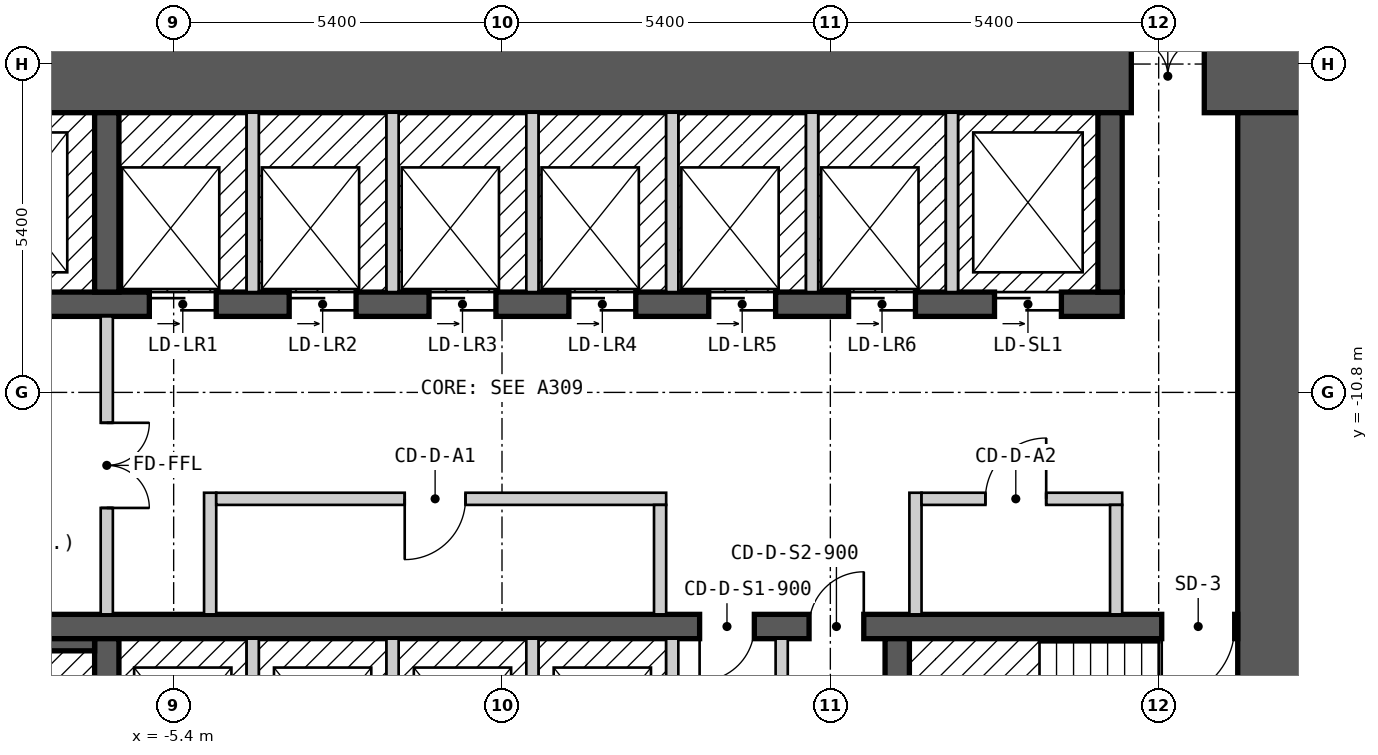
"""IFC4 building model, lengths in metres.
Left out: names, types, materials, properties, quantities, classifications, styles, units other than length and angle.
Written with IfcOpenShell. Run it as: python <this file> out.ifc"""

import sys

from ifc_helpers import new_model, si_unit, direction, frame, frame_2d, origin, place, context, subcontext, project, spatial, rectangle, extrude, element, fill, save


model = new_model("IFC4")
c1 = context("Model", 3, precision=1e-05, world=origin(), true_north=direction((0.0, 1.0)))
c2 = subcontext(c1, "Body", "Model", "MODEL_VIEW")
j1 = project(units=[si_unit("LENGTHUNIT", "METRE"), si_unit("PLANEANGLEUNIT", "RADIAN")], contexts=[c1])
p1 = place(None, origin())
s1 = spatial("IfcSite", under=j1, at=p1, CompositionType="ELEMENT")
p2 = place(p1, origin())
s2 = spatial("IfcBuilding", under=s1, at=p2, CompositionType="ELEMENT")
p3 = place(p2, frame((0.0, 0.0, 23.4)))
s3 = spatial("IfcBuildingStorey", under=s2, at=p3, CompositionType="ELEMENT", Elevation=23.4)
p4 = place(p3, frame((-13.3, -5.6, 0.0), z_axis=(0.0, 0.0, 1.0), x_axis=(1.0, 0.0, 0.0)))
e1 = element("IfcWall", 1, at=p4, inside=s3, PredefinedType="SHEAR", context=c2, shape_type="SweptSolid", body=[
    extrude(rectangle(XDim=26.6, YDim=1.2, at=frame_2d((13.3, 0.0))), origin(), (0.0, 0.0, 1.0), 2.7),
])
p5 = place(p4, frame((23.65, 0.0, 0.0)))
e2 = element("IfcOpeningElement", 2, at=p5, cuts=e1, PredefinedType="OPENING", context=c2, shape_type="SweptSolid", body=[
    extrude(rectangle(XDim=1.2, YDim=2.1, at=frame_2d((0.6, 1.05))), frame((0.0, 0.61, 0.0), z_axis=(0.0, -1.0, 0.0), x_axis=(1.0, 0.0, 0.0)), (0.0, 0.0, 1.0), 1.22),
])
p6 = place(p3, frame((12.7, -17.8, 0.0), z_axis=(0.0, 0.0, 1.0), x_axis=(0.0, 1.0, 0.0)))
e3 = element("IfcWall", 3, at=p6, inside=s3, PredefinedType="SHEAR", context=c2, shape_type="SweptSolid", body=[
    extrude(rectangle(XDim=11.6, YDim=1.2, at=frame_2d((5.8, 0.0))), origin(), (0.0, 0.0, 1.0), 2.7),
])
p7 = place(p3, frame((-12.1, -14.65, 0.0), z_axis=(0.0, 0.0, 1.0), x_axis=(1.0, 0.0, 0.0)))
e4 = element("IfcWall", 4, at=p7, inside=s3, PredefinedType="SHEAR", context=c2, shape_type="SweptSolid", body=[
    extrude(rectangle(XDim=24.2, YDim=0.4, at=frame_2d((12.1, 0.0))), origin(), (0.0, 0.0, 1.0), 2.7),
])
p8 = place(p7, frame((1.3, 0.0, 0.0), z_axis=(0.0, 0.0, 1.0), x_axis=(-1.0, 0.0, 0.0)))
e5 = element("IfcOpeningElement", 5, at=p8, cuts=e4, PredefinedType="OPENING", context=c2, shape_type="SweptSolid", body=[
    extrude(rectangle(XDim=1.2, YDim=2.1, at=frame_2d((0.6, 1.05))), frame((0.0, 0.21, 0.0), z_axis=(0.0, -1.0, 0.0), x_axis=(1.0, 0.0, 0.0)), (0.0, 0.0, 1.0), 0.42),
])
p9 = place(p7, frame((24.15, 0.0, 0.0), z_axis=(0.0, 0.0, 1.0), x_axis=(-1.0, 0.0, 0.0)))
e6 = element("IfcOpeningElement", 6, at=p9, cuts=e4, PredefinedType="OPENING", context=c2, shape_type="SweptSolid", body=[
    extrude(rectangle(XDim=1.2, YDim=2.1, at=frame_2d((0.6, 1.05))), frame((0.0, 0.21, 0.0), z_axis=(0.0, -1.0, 0.0), x_axis=(1.0, 0.0, 0.0)), (0.0, 0.0, 1.0), 0.42),
])
p10 = place(p7, frame((16.25, 0.0, 0.0), z_axis=(0.0, 0.0, 1.0), x_axis=(-1.0, 0.0, 0.0)))
e7 = element("IfcOpeningElement", 7, at=p10, cuts=e4, PredefinedType="OPENING", context=c2, shape_type="SweptSolid", body=[
    extrude(rectangle(XDim=0.9, YDim=2.1, at=frame_2d((0.45, 1.05))), frame((0.0, 0.21, 0.0), z_axis=(0.0, -1.0, 0.0), x_axis=(1.0, 0.0, 0.0)), (0.0, 0.0, 1.0), 0.42),
])
p11 = place(p7, frame((18.05, 0.0, 0.0), z_axis=(0.0, 0.0, 1.0), x_axis=(-1.0, 0.0, 0.0)))
e8 = element("IfcOpeningElement", 8, at=p11, cuts=e4, PredefinedType="OPENING", context=c2, shape_type="SweptSolid", body=[
    extrude(rectangle(XDim=0.9, YDim=2.1, at=frame_2d((0.45, 1.05))), frame((0.0, 0.21, 0.0), z_axis=(0.0, -1.0, 0.0), x_axis=(1.0, 0.0, 0.0)), (0.0, 0.0, 1.0), 0.42),
])
p12 = place(p3, frame((-12.1, -9.35, 0.0), z_axis=(0.0, 0.0, 1.0), x_axis=(1.0, 0.0, 0.0)))
e9 = element("IfcWall", 9, at=p12, inside=s3, PredefinedType="SHEAR", context=c2, shape_type="SweptSolid", body=[
    extrude(rectangle(XDim=22.3, YDim=0.4, at=frame_2d((11.15, 0.0))), origin(), (0.0, 0.0, 1.0), 2.7),
])
p13 = place(p12, frame((0.7, 0.0, 0.0)))
e10 = element("IfcOpeningElement", 10, at=p13, cuts=e9, PredefinedType="OPENING", context=c2, shape_type="SweptSolid", body=[
    extrude(rectangle(XDim=1.1, YDim=2.1, at=frame_2d((0.55, 1.05))), frame((0.0, 0.21, 0.0), z_axis=(0.0, -1.0, 0.0), x_axis=(1.0, 0.0, 0.0)), (0.0, 0.0, 1.0), 0.42),
])
p14 = place(p12, frame((3.5, 0.0, 0.0)))
e11 = element("IfcOpeningElement", 11, at=p14, cuts=e9, PredefinedType="OPENING", context=c2, shape_type="SweptSolid", body=[
    extrude(rectangle(XDim=1.1, YDim=2.1, at=frame_2d((0.55, 1.05))), frame((0.0, 0.21, 0.0), z_axis=(0.0, -1.0, 0.0), x_axis=(1.0, 0.0, 0.0)), (0.0, 0.0, 1.0), 0.42),
])
p15 = place(p12, frame((6.3, 0.0, 0.0)))
e12 = element("IfcOpeningElement", 12, at=p15, cuts=e9, PredefinedType="OPENING", context=c2, shape_type="SweptSolid", body=[
    extrude(rectangle(XDim=1.1, YDim=2.1, at=frame_2d((0.55, 1.05))), frame((0.0, 0.21, 0.0), z_axis=(0.0, -1.0, 0.0), x_axis=(1.0, 0.0, 0.0)), (0.0, 0.0, 1.0), 0.42),
])
p16 = place(p12, frame((8.6, 0.0, 0.0)))
e13 = element("IfcOpeningElement", 13, at=p16, cuts=e9, PredefinedType="OPENING", context=c2, shape_type="SweptSolid", body=[
    extrude(rectangle(XDim=1.1, YDim=2.1, at=frame_2d((0.55, 1.05))), frame((0.0, 0.21, 0.0), z_axis=(0.0, -1.0, 0.0), x_axis=(1.0, 0.0, 0.0)), (0.0, 0.0, 1.0), 0.42),
])
p17 = place(p12, frame((10.9, 0.0, 0.0)))
e14 = element("IfcOpeningElement", 14, at=p17, cuts=e9, PredefinedType="OPENING", context=c2, shape_type="SweptSolid", body=[
    extrude(rectangle(XDim=1.1, YDim=2.1, at=frame_2d((0.55, 1.05))), frame((0.0, 0.21, 0.0), z_axis=(0.0, -1.0, 0.0), x_axis=(1.0, 0.0, 0.0)), (0.0, 0.0, 1.0), 0.42),
])
p18 = place(p12, frame((13.2, 0.0, 0.0)))
e15 = element("IfcOpeningElement", 15, at=p18, cuts=e9, PredefinedType="OPENING", context=c2, shape_type="SweptSolid", body=[
    extrude(rectangle(XDim=1.1, YDim=2.1, at=frame_2d((0.55, 1.05))), frame((0.0, 0.21, 0.0), z_axis=(0.0, -1.0, 0.0), x_axis=(1.0, 0.0, 0.0)), (0.0, 0.0, 1.0), 0.42),
])
p19 = place(p12, frame((15.5, 0.0, 0.0)))
e16 = element("IfcOpeningElement", 16, at=p19, cuts=e9, PredefinedType="OPENING", context=c2, shape_type="SweptSolid", body=[
    extrude(rectangle(XDim=1.1, YDim=2.1, at=frame_2d((0.55, 1.05))), frame((0.0, 0.21, 0.0), z_axis=(0.0, -1.0, 0.0), x_axis=(1.0, 0.0, 0.0)), (0.0, 0.0, 1.0), 0.42),
])
p20 = place(p12, frame((17.8, 0.0, 0.0)))
e17 = element("IfcOpeningElement", 17, at=p20, cuts=e9, PredefinedType="OPENING", context=c2, shape_type="SweptSolid", body=[
    extrude(rectangle(XDim=1.1, YDim=2.1, at=frame_2d((0.55, 1.05))), frame((0.0, 0.21, 0.0), z_axis=(0.0, -1.0, 0.0), x_axis=(1.0, 0.0, 0.0)), (0.0, 0.0, 1.0), 0.42),
])
p21 = place(p12, frame((20.2, 0.0, 0.0)))
e18 = element("IfcOpeningElement", 18, at=p21, cuts=e9, PredefinedType="OPENING", context=c2, shape_type="SweptSolid", body=[
    extrude(rectangle(XDim=1.1, YDim=2.1, at=frame_2d((0.55, 1.05))), frame((0.0, 0.21, 0.0), z_axis=(0.0, -1.0, 0.0), x_axis=(1.0, 0.0, 0.0)), (0.0, 0.0, 1.0), 0.42),
])
for number, where, z_axis, x_axis in (
    (19, (-6.5, -17.8, 0.0), (0.0, 0.0, 1.0), (0.0, 1.0, 0.0)),
    (20, (6.5, -17.8, 0.0), (0.0, 0.0, 1.0), (0.0, 1.0, 0.0)),
    (21, (-6.5, -9.15, 0.0), (0.0, 0.0, 1.0), (0.0, 1.0, 0.0)),
    (22, (10.0, -9.15, 0.0), (0.0, 0.0, 1.0), (0.0, 1.0, 0.0)),
):
    element("IfcWall", number, at=place(p3, frame(where, z_axis=z_axis, x_axis=x_axis)), inside=s3, PredefinedType="SHEAR", context=c2, shape_type="SweptSolid", body=[
        extrude(rectangle(XDim=2.95, YDim=0.4, at=frame_2d((1.475, 0.0))), origin(), (0.0, 0.0, 1.0), 2.7),
    ])
p22 = place(p3, frame((-10.8, -14.95, 0.0), z_axis=(0.0, 0.0, 1.0), x_axis=(1.0, 0.0, 0.0)))
e23 = element("IfcWall", 23, at=p22, inside=s3, PredefinedType="SOLIDWALL", context=c2, shape_type="SweptSolid", body=[
    extrude(rectangle(XDim=4.1, YDim=0.2, at=frame_2d((2.05, 0.0))), origin(), (0.0, 0.0, 1.0), 2.7),
])
p23 = place(p3, frame((-6.5, -14.45, 0.0), z_axis=(0.0, 0.0, 1.0), x_axis=(0.0, 1.0, 0.0)))
e24 = element("IfcWall", 24, at=p23, inside=s3, PredefinedType="PARTITIONING", context=c2, shape_type="SweptSolid", body=[
    extrude(rectangle(XDim=4.9, YDim=0.2, at=frame_2d((2.45, 0.0))), origin(), (0.0, 0.0, 1.0), 2.7),
])
p24 = place(p23, frame((3.15, 0.0, 0.0), z_axis=(0.0, 0.0, 1.0), x_axis=(-1.0, 0.0, 0.0)))
e25 = element("IfcOpeningElement", 25, at=p24, cuts=e24, PredefinedType="OPENING", context=c2, shape_type="SweptSolid", body=[
    extrude(rectangle(XDim=1.4, YDim=2.1, at=frame_2d((0.7, 1.05))), frame((0.0, 0.11, 0.0), z_axis=(0.0, -1.0, 0.0), x_axis=(1.0, 0.0, 0.0)), (0.0, 0.0, 1.0), 0.22),
])
p25 = place(p3, frame((-4.8, -14.45, 0.0), z_axis=(0.0, 0.0, 1.0), x_axis=(0.0, 1.0, 0.0)))
e26 = element("IfcWall", 26, at=p25, inside=s3, PredefinedType="PARTITIONING", context=c2, shape_type="SweptSolid", body=[
    extrude(rectangle(XDim=2.0, YDim=0.2, at=frame_2d((1.0, 0.0))), origin(), (0.0, 0.0, 1.0), 2.7),
])
p26 = place(p3, frame((-4.7, -12.55, 0.0), z_axis=(0.0, 0.0, 1.0), x_axis=(1.0, 0.0, 0.0)))
e27 = element("IfcWall", 27, at=p26, inside=s3, PredefinedType="PARTITIONING", context=c2, shape_type="SweptSolid", body=[
    extrude(rectangle(XDim=7.4, YDim=0.2, at=frame_2d((3.7, 0.0))), origin(), (0.0, 0.0, 1.0), 2.7),
])
p27 = place(p26, frame((4.1, 0.0, 0.0), z_axis=(0.0, 0.0, 1.0), x_axis=(-1.0, 0.0, 0.0)))
e28 = element("IfcOpeningElement", 28, at=p27, cuts=e27, PredefinedType="OPENING", context=c2, shape_type="SweptSolid", body=[
    extrude(rectangle(XDim=1.0, YDim=2.1, at=frame_2d((0.5, 1.05))), frame((0.0, 0.11, 0.0), z_axis=(0.0, -1.0, 0.0), x_axis=(1.0, 0.0, 0.0)), (0.0, 0.0, 1.0), 0.22),
])
for number, where, z_axis, x_axis in (
    (29, (-4.1, -17.8, 0.0), (0.0, 0.0, 1.0), (0.0, 1.0, 0.0)),
    (30, (-4.1, -9.15, 0.0), (0.0, 0.0, 1.0), (0.0, 1.0, 0.0)),
    (31, (-1.8, -17.8, 0.0), (0.0, 0.0, 1.0), (0.0, 1.0, 0.0)),
    (32, (-1.8, -9.15, 0.0), (0.0, 0.0, 1.0), (0.0, 1.0, 0.0)),
    (33, (0.5, -17.8, 0.0), (0.0, 0.0, 1.0), (0.0, 1.0, 0.0)),
    (34, (0.5, -9.15, 0.0), (0.0, 0.0, 1.0), (0.0, 1.0, 0.0)),
):
    element("IfcWall", number, at=place(p3, frame(where, z_axis=z_axis, x_axis=x_axis)), inside=s3, PredefinedType="SOLIDWALL", context=c2, shape_type="SweptSolid", body=[
        extrude(rectangle(XDim=2.95, YDim=0.2, at=frame_2d((1.475, 0.0))), origin(), (0.0, 0.0, 1.0), 2.7),
    ])
p28 = place(p3, frame((2.6, -14.45, 0.0), z_axis=(0.0, 0.0, 1.0), x_axis=(0.0, 1.0, 0.0)))
e35 = element("IfcWall", 35, at=p28, inside=s3, PredefinedType="PARTITIONING", context=c2, shape_type="SweptSolid", body=[
    extrude(rectangle(XDim=1.8, YDim=0.2, at=frame_2d((0.9, 0.0))), origin(), (0.0, 0.0, 1.0), 2.7),
])
for number, where, z_axis, x_axis in (
    (36, (2.8, -17.8, 0.0), (0.0, 0.0, 1.0), (0.0, 1.0, 0.0)),
    (37, (2.8, -9.15, 0.0), (0.0, 0.0, 1.0), (0.0, 1.0, 0.0)),
):
    element("IfcWall", number, at=place(p3, frame(where, z_axis=z_axis, x_axis=x_axis)), inside=s3, PredefinedType="SOLIDWALL", context=c2, shape_type="SweptSolid", body=[
        extrude(rectangle(XDim=2.95, YDim=0.2, at=frame_2d((1.475, 0.0))), origin(), (0.0, 0.0, 1.0), 2.7),
    ])
p29 = place(p3, frame((4.6, -17.8, 0.0), z_axis=(0.0, 0.0, 1.0), x_axis=(0.0, 1.0, 0.0)))
e38 = element("IfcWall", 38, at=p29, inside=s3, PredefinedType="PARTITIONING", context=c2, shape_type="SweptSolid", body=[
    extrude(rectangle(XDim=2.95, YDim=0.2, at=frame_2d((1.475, 0.0))), origin(), (0.0, 0.0, 1.0), 2.7),
])
p30 = place(p3, frame((5.1, -9.15, 0.0), z_axis=(0.0, 0.0, 1.0), x_axis=(0.0, 1.0, 0.0)))
e39 = element("IfcWall", 39, at=p30, inside=s3, PredefinedType="SOLIDWALL", context=c2, shape_type="SweptSolid", body=[
    extrude(rectangle(XDim=2.95, YDim=0.2, at=frame_2d((1.475, 0.0))), origin(), (0.0, 0.0, 1.0), 2.7),
])
p31 = place(p3, frame((6.8, -14.45, 0.0), z_axis=(0.0, 0.0, 1.0), x_axis=(0.0, 1.0, 0.0)))
e40 = element("IfcWall", 40, at=p31, inside=s3, PredefinedType="PARTITIONING", context=c2, shape_type="SweptSolid", body=[
    extrude(rectangle(XDim=2.0, YDim=0.2, at=frame_2d((1.0, 0.0))), origin(), (0.0, 0.0, 1.0), 2.7),
])
p32 = place(p3, frame((6.9, -12.55, 0.0), z_axis=(0.0, 0.0, 1.0), x_axis=(1.0, 0.0, 0.0)))
e41 = element("IfcWall", 41, at=p32, inside=s3, PredefinedType="PARTITIONING", context=c2, shape_type="SweptSolid", body=[
    extrude(rectangle(XDim=3.3, YDim=0.2, at=frame_2d((1.65, 0.0))), origin(), (0.0, 0.0, 1.0), 2.7),
])
p33 = place(p32, frame((2.05, 0.0, 0.0), z_axis=(0.0, 0.0, 1.0), x_axis=(-1.0, 0.0, 0.0)))
e42 = element("IfcOpeningElement", 42, at=p33, cuts=e41, PredefinedType="OPENING", context=c2, shape_type="SweptSolid", body=[
    extrude(rectangle(XDim=1.0, YDim=2.1, at=frame_2d((0.5, 1.05))), frame((0.0, 0.11, 0.0), z_axis=(0.0, -1.0, 0.0), x_axis=(1.0, 0.0, 0.0)), (0.0, 0.0, 1.0), 0.22),
])
p34 = place(p3, frame((7.4, -9.15, 0.0), z_axis=(0.0, 0.0, 1.0), x_axis=(0.0, 1.0, 0.0)))
e43 = element("IfcWall", 43, at=p34, inside=s3, PredefinedType="SOLIDWALL", context=c2, shape_type="SweptSolid", body=[
    extrude(rectangle(XDim=2.95, YDim=0.2, at=frame_2d((1.475, 0.0))), origin(), (0.0, 0.0, 1.0), 2.7),
])
p35 = place(p3, frame((10.1, -14.45, 0.0), z_axis=(0.0, 0.0, 1.0), x_axis=(0.0, 1.0, 0.0)))
e44 = element("IfcWall", 44, at=p35, inside=s3, PredefinedType="PARTITIONING", context=c2, shape_type="SweptSolid", body=[
    extrude(rectangle(XDim=1.8, YDim=0.2, at=frame_2d((0.9, 0.0))), origin(), (0.0, 0.0, 1.0), 2.7),
])
p36 = place(p15, origin())
e45 = element("IfcDoor", 45, at=p36, inside=s3, OperationType="DOUBLE_DOOR_SLIDING", PredefinedType="DOOR", context=c2, shape_type="SweptSolid", body=[
    extrude(rectangle(XDim=1.1, YDim=2.1, at=frame_2d((0.55, 1.05))), frame((0.0, 0.025, 0.0), z_axis=(0.0, -1.0, 0.0), x_axis=(1.0, 0.0, 0.0)), (0.0, 0.0, 1.0), 0.05),
])
fill(e12, e45)
p37 = place(p16, origin())
e46 = element("IfcDoor", 46, at=p37, inside=s3, OperationType="DOUBLE_DOOR_SLIDING", PredefinedType="DOOR", context=c2, shape_type="SweptSolid", body=[
    extrude(rectangle(XDim=1.1, YDim=2.1, at=frame_2d((0.55, 1.05))), frame((0.0, 0.025, 0.0), z_axis=(0.0, -1.0, 0.0), x_axis=(1.0, 0.0, 0.0)), (0.0, 0.0, 1.0), 0.05),
])
fill(e13, e46)
p38 = place(p17, origin())
e47 = element("IfcDoor", 47, at=p38, inside=s3, OperationType="DOUBLE_DOOR_SLIDING", PredefinedType="DOOR", context=c2, shape_type="SweptSolid", body=[
    extrude(rectangle(XDim=1.1, YDim=2.1, at=frame_2d((0.55, 1.05))), frame((0.0, 0.025, 0.0), z_axis=(0.0, -1.0, 0.0), x_axis=(1.0, 0.0, 0.0)), (0.0, 0.0, 1.0), 0.05),
])
fill(e14, e47)
p39 = place(p18, origin())
e48 = element("IfcDoor", 48, at=p39, inside=s3, OperationType="DOUBLE_DOOR_SLIDING", PredefinedType="DOOR", context=c2, shape_type="SweptSolid", body=[
    extrude(rectangle(XDim=1.1, YDim=2.1, at=frame_2d((0.55, 1.05))), frame((0.0, 0.025, 0.0), z_axis=(0.0, -1.0, 0.0), x_axis=(1.0, 0.0, 0.0)), (0.0, 0.0, 1.0), 0.05),
])
fill(e15, e48)
p40 = place(p19, origin())
e49 = element("IfcDoor", 49, at=p40, inside=s3, OperationType="DOUBLE_DOOR_SLIDING", PredefinedType="DOOR", context=c2, shape_type="SweptSolid", body=[
    extrude(rectangle(XDim=1.1, YDim=2.1, at=frame_2d((0.55, 1.05))), frame((0.0, 0.025, 0.0), z_axis=(0.0, -1.0, 0.0), x_axis=(1.0, 0.0, 0.0)), (0.0, 0.0, 1.0), 0.05),
])
fill(e16, e49)
p41 = place(p20, origin())
e50 = element("IfcDoor", 50, at=p41, inside=s3, OperationType="DOUBLE_DOOR_SLIDING", PredefinedType="DOOR", context=c2, shape_type="SweptSolid", body=[
    extrude(rectangle(XDim=1.1, YDim=2.1, at=frame_2d((0.55, 1.05))), frame((0.0, 0.025, 0.0), z_axis=(0.0, -1.0, 0.0), x_axis=(1.0, 0.0, 0.0)), (0.0, 0.0, 1.0), 0.05),
])
fill(e17, e50)
p42 = place(p21, origin())
e51 = element("IfcDoor", 51, at=p42, inside=s3, OperationType="DOUBLE_DOOR_SLIDING", PredefinedType="DOOR", context=c2, shape_type="SweptSolid", body=[
    extrude(rectangle(XDim=1.1, YDim=2.1, at=frame_2d((0.55, 1.05))), frame((0.0, 0.025, 0.0), z_axis=(0.0, -1.0, 0.0), x_axis=(1.0, 0.0, 0.0)), (0.0, 0.0, 1.0), 0.05),
])
fill(e18, e51)
p43 = place(p9, origin())
e52 = element("IfcDoor", 52, at=p43, inside=s3, OperationType="SINGLE_SWING_RIGHT", PredefinedType="DOOR", context=c2, shape_type="SweptSolid", body=[
    extrude(rectangle(XDim=1.2, YDim=2.1, at=frame_2d((0.6, 1.05))), frame((0.0, 0.025, 0.0), z_axis=(0.0, -1.0, 0.0), x_axis=(1.0, 0.0, 0.0)), (0.0, 0.0, 1.0), 0.05),
])
fill(e6, e52)
p44 = place(p24, origin())
e53 = element("IfcDoor", 53, at=p44, inside=s3, OperationType="DOUBLE_DOOR_SINGLE_SWING", PredefinedType="DOOR", context=c2, shape_type="SweptSolid", body=[
    extrude(rectangle(XDim=1.4, YDim=2.1, at=frame_2d((0.7, 1.05))), frame((0.0, 0.025, 0.0), z_axis=(0.0, -1.0, 0.0), x_axis=(1.0, 0.0, 0.0)), (0.0, 0.0, 1.0), 0.05),
])
fill(e25, e53)
p45 = place(p5, origin())
e54 = element("IfcDoor", 54, at=p45, inside=s3, OperationType="DOUBLE_DOOR_SINGLE_SWING", PredefinedType="DOOR", context=c2, shape_type="SweptSolid", body=[
    extrude(rectangle(XDim=1.2, YDim=2.1, at=frame_2d((0.6, 1.05))), frame((0.0, 0.025, 0.0), z_axis=(0.0, -1.0, 0.0), x_axis=(1.0, 0.0, 0.0)), (0.0, 0.0, 1.0), 0.05),
])
fill(e2, e54)
p46 = place(p27, origin())
e55 = element("IfcDoor", 55, at=p46, inside=s3, OperationType="SINGLE_SWING_RIGHT", PredefinedType="DOOR", context=c2, shape_type="SweptSolid", body=[
    extrude(rectangle(XDim=1.0, YDim=2.1, at=frame_2d((0.5, 1.05))), frame((0.0, 0.025, 0.0), z_axis=(0.0, -1.0, 0.0), x_axis=(1.0, 0.0, 0.0)), (0.0, 0.0, 1.0), 0.05),
])
fill(e28, e55)
p47 = place(p33, origin())
e56 = element("IfcDoor", 56, at=p47, inside=s3, OperationType="SINGLE_SWING_LEFT", PredefinedType="DOOR", context=c2, shape_type="SweptSolid", body=[
    extrude(rectangle(XDim=1.0, YDim=2.1, at=frame_2d((0.5, 1.05))), frame((0.0, 0.025, 0.0), z_axis=(0.0, -1.0, 0.0), x_axis=(1.0, 0.0, 0.0)), (0.0, 0.0, 1.0), 0.05),
])
fill(e42, e56)
p48 = place(p10, origin())
e57 = element("IfcDoor", 57, at=p48, inside=s3, OperationType="SINGLE_SWING_RIGHT", PredefinedType="DOOR", context=c2, shape_type="SweptSolid", body=[
    extrude(rectangle(XDim=0.9, YDim=2.1, at=frame_2d((0.45, 1.05))), frame((0.0, 0.025, 0.0), z_axis=(0.0, -1.0, 0.0), x_axis=(1.0, 0.0, 0.0)), (0.0, 0.0, 1.0), 0.05),
])
fill(e7, e57)
p49 = place(p11, origin())
e58 = element("IfcDoor", 58, at=p49, inside=s3, OperationType="SINGLE_SWING_LEFT", PredefinedType="DOOR", context=c2, shape_type="SweptSolid", body=[
    extrude(rectangle(XDim=0.9, YDim=2.1, at=frame_2d((0.45, 1.05))), frame((0.0, 0.025, 0.0), z_axis=(0.0, -1.0, 0.0), x_axis=(1.0, 0.0, 0.0)), (0.0, 0.0, 1.0), 0.05),
])
fill(e8, e58)
save(model, sys.argv[1])
